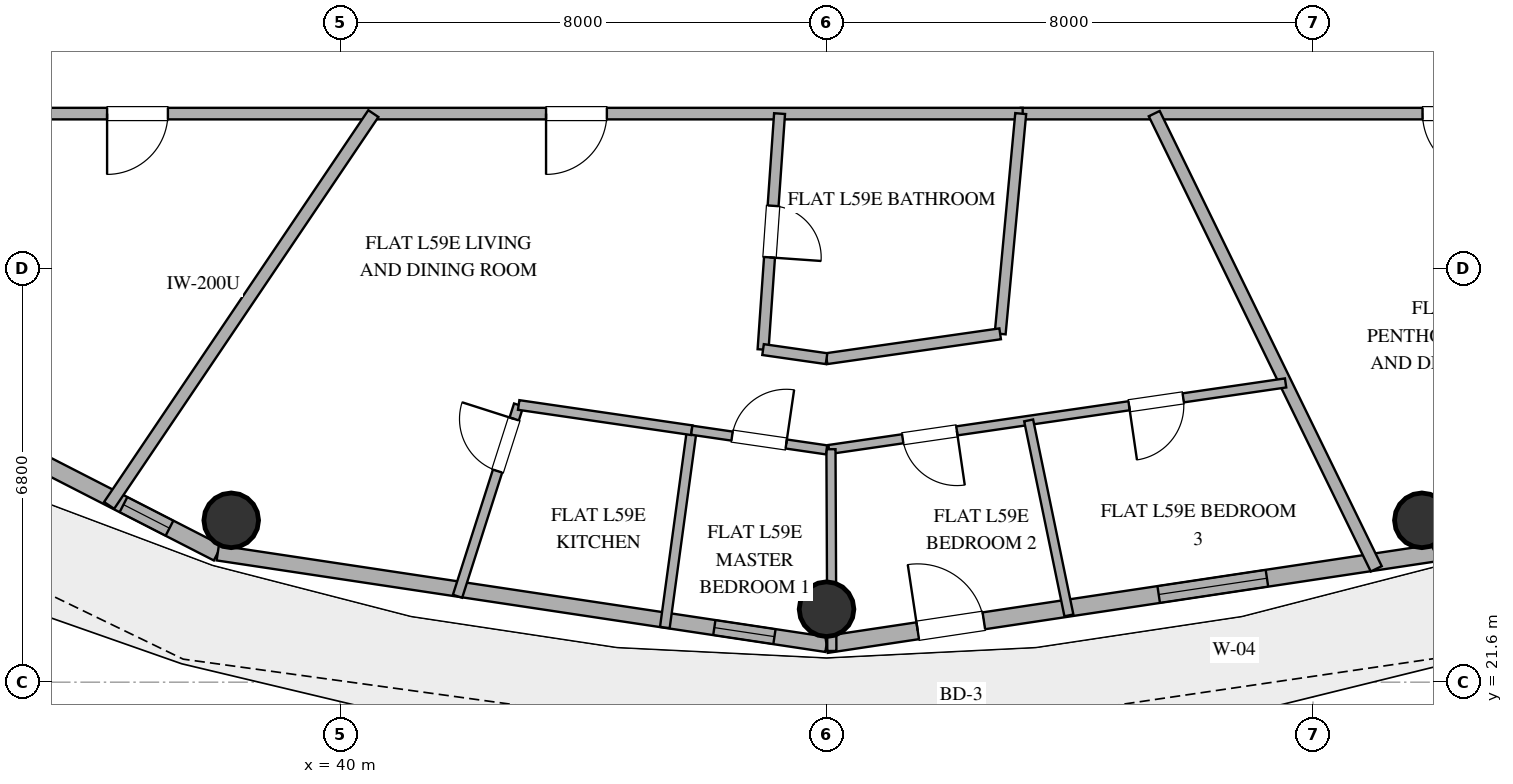
"""IFC4 building model, lengths in metres.
Left out: names, types, materials, properties, quantities, classifications, styles, units other than length and angle.
Written with IfcOpenShell. Run it as: python <this file> out.ifc"""

import sys

from ifc_helpers import new_model, si_unit, direction, frame, frame_2d, origin, origin_2d, place, context, subcontext, project, spatial, rectangle, hollow_circle, extrude, element, fill, save


model = new_model("IFC4")
c1 = context("Model", 3, precision=1e-05, world=origin(), true_north=direction((0.0, 1.0)))
c2 = subcontext(c1, "Body", "Model", "MODEL_VIEW")
j1 = project(units=[si_unit("LENGTHUNIT", "METRE"), si_unit("PLANEANGLEUNIT", "RADIAN")], contexts=[c1])
p1 = place(None, origin())
s1 = spatial("IfcSite", under=j1, at=p1, CompositionType="ELEMENT")
p2 = place(p1, origin())
s2 = spatial("IfcBuilding", under=s1, at=p2, CompositionType="ELEMENT")
p3 = place(p2, frame((0.0, 0.0, 231.6)))
s3 = spatial("IfcBuildingStorey", under=s2, at=p3, CompositionType="ELEMENT", Elevation=231.6)
for number, where, z_axis, x_axis in (
    (1, (38.209, 24.261, 0.0), (0.0, 0.0, 1.0), (1.0, 0.0, 0.0)),
    (2, (48.0, 22.8, 0.0), (0.0, 0.0, 1.0), (1.0, 0.0, 0.0)),
    (3, (57.791, 24.261, 0.0), (0.0, 0.0, 1.0), (1.0, 0.0, 0.0)),
):
    element("IfcColumn", number, at=place(p3, frame(where, z_axis=z_axis, x_axis=x_axis)), inside=s3, PredefinedType="COLUMN", context=c2, shape_type="SweptSolid", body=[
        extrude(hollow_circle(Radius=0.45, WallThickness=0.025, at=origin_2d()), origin(), (0.0, 0.0, 1.0), 3.36),
    ])
p4 = place(p3, frame((29.617, 28.013, 0.0), z_axis=(0.0, 0.0, 1.0), x_axis=(0.890007394051, -0.455946091699, 0.0)))
e4 = element("IfcWall", 4, at=p4, inside=s3, PredefinedType="SOLIDWALL", context=c2, shape_type="SweptSolid", body=[
    extrude(rectangle(XDim=9.404, YDim=0.28, at=frame_2d((4.702, 0.0))), origin(), (0.0, 0.0, 1.0), 3.36),
])
p5 = place(p4, frame((2.653, 0.0, 0.85)))
e5 = element("IfcOpeningElement", 5, at=p5, cuts=e4, PredefinedType="OPENING", context=c2, shape_type="SweptSolid", body=[
    extrude(rectangle(XDim=1.2, YDim=1.8, at=frame_2d((0.6, 0.9))), frame((0.0, 0.15, 0.0), z_axis=(0.0, -1.0, 0.0), x_axis=(1.0, 0.0, 0.0)), (0.0, 0.0, 1.0), 0.3),
])
p6 = place(p4, frame((4.93, 0.0, 0.85)))
e6 = element("IfcOpeningElement", 6, at=p6, cuts=e4, PredefinedType="OPENING", context=c2, shape_type="SweptSolid", body=[
    extrude(rectangle(XDim=1.2, YDim=1.8, at=frame_2d((0.6, 0.9))), frame((0.0, 0.15, 0.0), z_axis=(0.0, -1.0, 0.0), x_axis=(1.0, 0.0, 0.0)), (0.0, 0.0, 1.0), 0.3),
])
p7 = place(p4, frame((7.663, 0.0, 0.85)))
e7 = element("IfcOpeningElement", 7, at=p7, cuts=e4, PredefinedType="OPENING", context=c2, shape_type="SweptSolid", body=[
    extrude(rectangle(XDim=0.85, YDim=1.8, at=frame_2d((0.425, 0.9))), frame((0.0, 0.15, 0.0), z_axis=(0.0, -1.0, 0.0), x_axis=(1.0, 0.0, 0.0)), (0.0, 0.0, 1.0), 0.3),
])
p8 = place(p3, frame((37.987, 23.726, 0.0), z_axis=(0.0, 0.0, 1.0), x_axis=(0.988882522213, -0.148698881169, 0.0)))
e8 = element("IfcWall", 8, at=p8, inside=s3, PredefinedType="SOLIDWALL", context=c2, shape_type="SweptSolid", body=[
    extrude(rectangle(XDim=10.125, YDim=0.25, at=frame_2d((5.062, 0.0))), origin(), (0.0, 0.0, 1.0), 3.36),
])
p9 = place(p8, frame((8.259, 0.0, 1.42)))
e9 = element("IfcOpeningElement", 9, at=p9, cuts=e8, PredefinedType="OPENING", context=c2, shape_type="SweptSolid", body=[
    extrude(rectangle(XDim=1.0, YDim=1.05, at=frame_2d((0.5, 0.525))), frame((0.0, 0.135, 0.0), z_axis=(0.0, -1.0, 0.0), x_axis=(1.0, 0.0, 0.0)), (0.0, 0.0, 1.0), 0.27),
])
p10 = place(p3, frame((48.0, 22.22, 0.0), z_axis=(0.0, 0.0, 1.0), x_axis=(0.988882522213, 0.148698881169, 0.0)))
e10 = element("IfcWall", 10, at=p10, inside=s3, PredefinedType="SOLIDWALL", context=c2, shape_type="SweptSolid", body=[
    extrude(rectangle(XDim=10.125, YDim=0.28, at=frame_2d((5.062, 0.0))), origin(), (0.0, 0.0, 1.0), 3.36),
])
p11 = place(p10, frame((1.516, 0.0, 0.0)))
e11 = element("IfcOpeningElement", 11, at=p11, cuts=e10, PredefinedType="OPENING", context=c2, shape_type="SweptSolid", body=[
    extrude(rectangle(XDim=1.1, YDim=2.25, at=frame_2d((0.55, 1.125))), frame((0.0, 0.15, 0.0), z_axis=(0.0, -1.0, 0.0), x_axis=(1.0, 0.0, 0.0)), (0.0, 0.0, 1.0), 0.3),
])
p12 = place(p10, frame((5.524, 0.0, 0.85)))
e12 = element("IfcOpeningElement", 12, at=p12, cuts=e10, PredefinedType="OPENING", context=c2, shape_type="SweptSolid", body=[
    extrude(rectangle(XDim=1.8, YDim=2.2, at=frame_2d((0.9, 1.1))), frame((0.0, 0.15, 0.0), z_axis=(0.0, -1.0, 0.0), x_axis=(1.0, 0.0, 0.0)), (0.0, 0.0, 1.0), 0.3),
])
p13 = place(p3, frame((63.25, 30.95, 0.0), z_axis=(0.0, 0.0, 1.0), x_axis=(-1.0, 0.0, 0.0)))
e13 = element("IfcWall", 13, at=p13, inside=s3, PredefinedType="PARTITIONING", context=c2, shape_type="SweptSolid", body=[
    extrude(rectangle(XDim=12.056, YDim=0.19, at=frame_2d((6.028, 0.0))), origin(), (0.0, 0.0, 1.0), 2.72),
])
p14 = place(p13, frame((4.448, 0.0, 0.0)))
e14 = element("IfcOpeningElement", 14, at=p14, cuts=e13, PredefinedType="OPENING", context=c2, shape_type="SweptSolid", body=[
    extrude(rectangle(XDim=1.0, YDim=2.2, at=frame_2d((0.5, 1.1))), frame((0.0, 0.105, 0.0), z_axis=(0.0, -1.0, 0.0), x_axis=(1.0, 0.0, 0.0)), (0.0, 0.0, 1.0), 0.21),
])
p15 = place(p3, frame((51.226, 30.95, 0.0), z_axis=(0.0, 0.0, 1.0), x_axis=(-1.0, 0.0, 0.0)))
e15 = element("IfcWall", 15, at=p15, inside=s3, PredefinedType="PARTITIONING", context=c2, shape_type="SweptSolid", body=[
    extrude(rectangle(XDim=18.476, YDim=0.19, at=frame_2d((9.238, 0.0))), origin(), (0.0, 0.0, 1.0), 2.72),
])
p16 = place(p15, frame((14.058, 0.0, 0.0)))
e16 = element("IfcOpeningElement", 16, at=p16, cuts=e15, PredefinedType="OPENING", context=c2, shape_type="SweptSolid", body=[
    extrude(rectangle(XDim=1.0, YDim=2.2, at=frame_2d((0.5, 1.1))), frame((0.0, 0.105, 0.0), z_axis=(0.0, -1.0, 0.0), x_axis=(1.0, 0.0, 0.0)), (0.0, 0.0, 1.0), 0.21),
])
p17 = place(p15, frame((6.839, 0.0, 0.0)))
e17 = element("IfcOpeningElement", 17, at=p17, cuts=e15, PredefinedType="OPENING", context=c2, shape_type="SweptSolid", body=[
    extrude(rectangle(XDim=1.0, YDim=2.2, at=frame_2d((0.5, 1.1))), frame((0.0, 0.105, 0.0), z_axis=(0.0, -1.0, 0.0), x_axis=(1.0, 0.0, 0.0)), (0.0, 0.0, 1.0), 0.21),
])
p18 = place(p3, frame((36.201, 24.507, 0.0), z_axis=(0.0, 0.0, 1.0), x_axis=(0.559208454265, 0.8290270832, 0.0)))
e18 = element("IfcWall", 18, at=p18, inside=s3, PredefinedType="PARTITIONING", context=c2, shape_type="SweptSolid", body=[
    extrude(rectangle(XDim=7.771, YDim=0.2, at=frame_2d((3.886, 0.0))), origin(), (0.0, 0.0, 1.0), 2.72),
])
p19 = place(p3, frame((53.389, 30.95, 0.0), z_axis=(0.0, 0.0, 1.0), x_axis=(0.438386671508, -0.898786474222, 0.0)))
e19 = element("IfcWall", 19, at=p19, inside=s3, PredefinedType="PARTITIONING", context=c2, shape_type="SweptSolid", body=[
    extrude(rectangle(XDim=8.329, YDim=0.2, at=frame_2d((4.165, 0.0))), origin(), (0.0, 0.0, 1.0), 2.72),
])
p20 = place(p3, frame((55.55, 26.521, 0.0), z_axis=(0.0, 0.0, 1.0), x_axis=(-0.989535469331, -0.144289829636, 0.0)))
e20 = element("IfcWall", 20, at=p20, inside=s3, PredefinedType="PARTITIONING", context=c2, shape_type="SweptSolid", body=[
    extrude(rectangle(XDim=7.589, YDim=0.15, at=frame_2d((3.794, 0.0))), origin(), (0.0, 0.0, 1.0), 2.72),
])
p21 = place(p20, frame((1.701, 0.0, 0.0)))
e21 = element("IfcOpeningElement", 21, at=p21, cuts=e20, PredefinedType="OPENING", context=c2, shape_type="SweptSolid", body=[
    extrude(rectangle(XDim=0.9, YDim=2.1, at=frame_2d((0.45, 1.05))), frame((0.0, 0.085, 0.0), z_axis=(0.0, -1.0, 0.0), x_axis=(1.0, 0.0, 0.0)), (0.0, 0.0, 1.0), 0.17),
])
p22 = place(p20, frame((5.464, 0.0, 0.0)))
e22 = element("IfcOpeningElement", 22, at=p22, cuts=e20, PredefinedType="OPENING", context=c2, shape_type="SweptSolid", body=[
    extrude(rectangle(XDim=0.9, YDim=2.1, at=frame_2d((0.45, 1.05))), frame((0.0, 0.085, 0.0), z_axis=(0.0, -1.0, 0.0), x_axis=(1.0, 0.0, 0.0)), (0.0, 0.0, 1.0), 0.17),
])
p23 = place(p3, frame((47.227, 30.95, 0.0), z_axis=(0.0, 0.0, 1.0), x_axis=(-0.0697885329, -0.997561807948, 0.0)))
e23 = element("IfcWall", 23, at=p23, inside=s3, PredefinedType="PLUMBINGWALL", context=c2, shape_type="SweptSolid", body=[
    extrude(rectangle(XDim=3.89, YDim=0.18, at=frame_2d((1.945, 0.0))), origin(), (0.0, 0.0, 1.0), 2.72),
])
p24 = place(p23, frame((1.52, 0.0, 0.0)))
e24 = element("IfcOpeningElement", 24, at=p24, cuts=e23, PredefinedType="OPENING", context=c2, shape_type="SweptSolid", body=[
    extrude(rectangle(XDim=0.85, YDim=2.1, at=frame_2d((0.425, 1.05))), frame((0.0, 0.1, 0.0), z_axis=(0.0, -1.0, 0.0), x_axis=(1.0, 0.0, 0.0)), (0.0, 0.0, 1.0), 0.2),
])
p25 = place(p3, frame((50.855, 27.329, 0.0), z_axis=(0.0, 0.0, 1.0), x_axis=(0.093035036072, 0.995662835534, 0.0)))
e25 = element("IfcWall", 25, at=p25, inside=s3, PredefinedType="PLUMBINGWALL", context=c2, shape_type="SweptSolid", body=[
    extrude(rectangle(XDim=3.637, YDim=0.18, at=frame_2d((1.819, 0.0))), origin(), (0.0, 0.0, 1.0), 2.72),
])
p26 = place(p3, frame((48.087, 22.113, 0.0), z_axis=(0.0, 0.0, 1.0), x_axis=(-0.004415292895, 0.999990252547, 0.0)))
e26 = element("IfcWall", 26, at=p26, inside=s3, PredefinedType="PARTITIONING", context=c2, shape_type="SweptSolid", body=[
    extrude(rectangle(XDim=3.318, YDim=0.15, at=frame_2d((1.659, 0.0))), origin(), (0.0, 0.0, 1.0), 2.72),
])
p27 = place(p3, frame((41.931, 23.013, 0.0), z_axis=(0.0, 0.0, 1.0), x_axis=(0.304448437733, 0.952528817812, 0.0)))
e27 = element("IfcWall", 27, at=p27, inside=s3, PredefinedType="PLUMBINGWALL", context=c2, shape_type="SweptSolid", body=[
    extrude(rectangle(XDim=3.302, YDim=0.16, at=frame_2d((1.651, 0.0))), origin(), (0.0, 0.0, 1.0), 2.72),
])
p28 = place(p27, frame((2.161, 0.0, 0.0)))
e28 = element("IfcOpeningElement", 28, at=p28, cuts=e27, PredefinedType="OPENING", context=c2, shape_type="SweptSolid", body=[
    extrude(rectangle(XDim=0.9, YDim=2.1, at=frame_2d((0.45, 1.05))), frame((0.0, 0.09, 0.0), z_axis=(0.0, -1.0, 0.0), x_axis=(1.0, 0.0, 0.0)), (0.0, 0.0, 1.0), 0.18),
])
p29 = place(p3, frame((45.341, 22.499, 0.0), z_axis=(0.0, 0.0, 1.0), x_axis=(0.135083263994, 0.990834250412, 0.0)))
e29 = element("IfcWall", 29, at=p29, inside=s3, PredefinedType="PLUMBINGWALL", context=c2, shape_type="SweptSolid", body=[
    extrude(rectangle(XDim=3.275, YDim=0.16, at=frame_2d((1.637, 0.0))), origin(), (0.0, 0.0, 1.0), 2.72),
])
p30 = place(p3, frame((51.324, 25.905, 0.0), z_axis=(0.0, 0.0, 1.0), x_axis=(0.202292458381, -0.979325156055, 0.0)))
e30 = element("IfcWall", 30, at=p30, inside=s3, PredefinedType="PARTITIONING", context=c2, shape_type="SweptSolid", body=[
    extrude(rectangle(XDim=3.274, YDim=0.15, at=frame_2d((1.637, 0.0))), origin(), (0.0, 0.0, 1.0), 2.72),
])
p31 = place(p3, frame((48.0, 26.92, 0.0), z_axis=(0.0, 0.0, 1.0), x_axis=(0.989910519943, 0.141693904265, 0.0)))
e31 = element("IfcWall", 31, at=p31, inside=s3, PredefinedType="PLUMBINGWALL", context=c2, shape_type="SweptSolid", body=[
    extrude(rectangle(XDim=2.884, YDim=0.18, at=frame_2d((1.442, 0.0))), origin(), (0.0, 0.0, 1.0), 2.72),
])
p32 = place(p3, frame((42.937, 26.158, 0.0), z_axis=(0.0, 0.0, 1.0), x_axis=(0.989548377589, -0.144201277427, 0.0)))
e32 = element("IfcWall", 32, at=p32, inside=s3, PredefinedType="PLUMBINGWALL", context=c2, shape_type="SweptSolid", body=[
    extrude(rectangle(XDim=2.876, YDim=0.16, at=frame_2d((1.438, 0.0))), origin(), (0.0, 0.0, 1.0), 2.72),
])
p33 = place(p3, frame((45.783, 25.743, 0.0), z_axis=(0.0, 0.0, 1.0), x_axis=(0.989520009013, -0.144395816293, 0.0)))
e33 = element("IfcWall", 33, at=p33, inside=s3, PredefinedType="PARTITIONING", context=c2, shape_type="SweptSolid", body=[
    extrude(rectangle(XDim=2.24, YDim=0.15, at=frame_2d((1.12, 0.0))), origin(), (0.0, 0.0, 1.0), 2.72),
])
p34 = place(p33, frame((0.67, 0.0, 0.0)))
e34 = element("IfcOpeningElement", 34, at=p34, cuts=e33, PredefinedType="OPENING", context=c2, shape_type="SweptSolid", body=[
    extrude(rectangle(XDim=0.9, YDim=2.1, at=frame_2d((0.45, 1.05))), frame((0.0, 0.085, 0.0), z_axis=(0.0, -1.0, 0.0), x_axis=(1.0, 0.0, 0.0)), (0.0, 0.0, 1.0), 0.17),
])
p35 = place(p3, frame((46.956, 27.069, 0.0), z_axis=(0.0, 0.0, 1.0), x_axis=(0.989917064499, -0.141648174766, 0.0)))
e35 = element("IfcWall", 35, at=p35, inside=s3, PredefinedType="PLUMBINGWALL", context=c2, shape_type="SweptSolid", body=[
    extrude(rectangle(XDim=1.055, YDim=0.18, at=frame_2d((0.527, 0.0))), origin(), (0.0, 0.0, 1.0), 2.72),
])
p36 = place(p11, origin())
e36 = element("IfcDoor", 36, at=p36, inside=s3, OperationType="SINGLE_SWING_LEFT", PredefinedType="DOOR", context=c2, shape_type="SweptSolid", body=[
    extrude(rectangle(XDim=1.1, YDim=2.25, at=frame_2d((0.55, 1.125))), frame((0.0, 0.025, 0.0), z_axis=(0.0, -1.0, 0.0), x_axis=(1.0, 0.0, 0.0)), (0.0, 0.0, 1.0), 0.05),
])
fill(e11, e36)
p37 = place(p12, origin())
e37 = element("IfcWindow", 37, at=p37, inside=s3, PartitioningType="SINGLE_PANEL", PredefinedType="WINDOW", context=c2, shape_type="SweptSolid", body=[
    extrude(rectangle(XDim=1.8, YDim=2.2, at=frame_2d((0.9, 1.1))), frame((0.0, 0.03, 0.0), z_axis=(0.0, -1.0, 0.0), x_axis=(1.0, 0.0, 0.0)), (0.0, 0.0, 1.0), 0.06),
])
fill(e12, e37)
p38 = place(p7, origin())
e38 = element("IfcWindow", 38, at=p38, inside=s3, PartitioningType="SINGLE_PANEL", PredefinedType="WINDOW", context=c2, shape_type="SweptSolid", body=[
    extrude(rectangle(XDim=0.85, YDim=1.8, at=frame_2d((0.425, 0.9))), frame((0.0, 0.03, 0.0), z_axis=(0.0, -1.0, 0.0), x_axis=(1.0, 0.0, 0.0)), (0.0, 0.0, 1.0), 0.06),
])
fill(e7, e38)
p39 = place(p9, origin())
e39 = element("IfcWindow", 39, at=p39, inside=s3, PartitioningType="SINGLE_PANEL", PredefinedType="WINDOW", context=c2, shape_type="SweptSolid", body=[
    extrude(rectangle(XDim=1.0, YDim=1.05, at=frame_2d((0.5, 0.525))), frame((0.0, 0.03, 0.0), z_axis=(0.0, -1.0, 0.0), x_axis=(1.0, 0.0, 0.0)), (0.0, 0.0, 1.0), 0.06),
])
fill(e9, e39)
p40 = place(p14, origin())
e40 = element("IfcDoor", 40, at=p40, inside=s3, OperationType="SINGLE_SWING_LEFT", PredefinedType="DOOR", context=c2, shape_type="SweptSolid", body=[
    extrude(rectangle(XDim=1.0, YDim=2.2, at=frame_2d((0.5, 1.1))), frame((0.0, 0.025, 0.0), z_axis=(0.0, -1.0, 0.0), x_axis=(1.0, 0.0, 0.0)), (0.0, 0.0, 1.0), 0.05),
])
fill(e14, e40)
p41 = place(p16, origin())
e41 = element("IfcDoor", 41, at=p41, inside=s3, OperationType="SINGLE_SWING_RIGHT", PredefinedType="DOOR", context=c2, shape_type="SweptSolid", body=[
    extrude(rectangle(XDim=1.0, YDim=2.2, at=frame_2d((0.5, 1.1))), frame((0.0, 0.025, 0.0), z_axis=(0.0, -1.0, 0.0), x_axis=(1.0, 0.0, 0.0)), (0.0, 0.0, 1.0), 0.05),
])
fill(e16, e41)
p42 = place(p17, origin())
e42 = element("IfcDoor", 42, at=p42, inside=s3, OperationType="SINGLE_SWING_RIGHT", PredefinedType="DOOR", context=c2, shape_type="SweptSolid", body=[
    extrude(rectangle(XDim=1.0, YDim=2.2, at=frame_2d((0.5, 1.1))), frame((0.0, 0.025, 0.0), z_axis=(0.0, -1.0, 0.0), x_axis=(1.0, 0.0, 0.0)), (0.0, 0.0, 1.0), 0.05),
])
fill(e17, e42)
p43 = place(p21, origin())
e43 = element("IfcDoor", 43, at=p43, inside=s3, OperationType="SINGLE_SWING_RIGHT", PredefinedType="DOOR", context=c2, shape_type="SweptSolid", body=[
    extrude(rectangle(XDim=0.9, YDim=2.1, at=frame_2d((0.45, 1.05))), frame((0.0, 0.025, 0.0), z_axis=(0.0, -1.0, 0.0), x_axis=(1.0, 0.0, 0.0)), (0.0, 0.0, 1.0), 0.05),
])
fill(e21, e43)
p44 = place(p22, origin())
e44 = element("IfcDoor", 44, at=p44, inside=s3, OperationType="SINGLE_SWING_LEFT", PredefinedType="DOOR", context=c2, shape_type="SweptSolid", body=[
    extrude(rectangle(XDim=0.9, YDim=2.1, at=frame_2d((0.45, 1.05))), frame((0.0, 0.025, 0.0), z_axis=(0.0, -1.0, 0.0), x_axis=(1.0, 0.0, 0.0)), (0.0, 0.0, 1.0), 0.05),
])
fill(e22, e44)
p45 = place(p24, origin())
e45 = element("IfcDoor", 45, at=p45, inside=s3, OperationType="SINGLE_SWING_RIGHT", PredefinedType="DOOR", context=c2, shape_type="SweptSolid", body=[
    extrude(rectangle(XDim=0.85, YDim=2.1, at=frame_2d((0.425, 1.05))), frame((0.0, 0.025, 0.0), z_axis=(0.0, -1.0, 0.0), x_axis=(1.0, 0.0, 0.0)), (0.0, 0.0, 1.0), 0.05),
])
fill(e24, e45)
p46 = place(p28, origin())
e46 = element("IfcDoor", 46, at=p46, inside=s3, OperationType="SINGLE_SWING_RIGHT", PredefinedType="DOOR", context=c2, shape_type="SweptSolid", body=[
    extrude(rectangle(XDim=0.9, YDim=2.1, at=frame_2d((0.45, 1.05))), frame((0.0, 0.025, 0.0), z_axis=(0.0, -1.0, 0.0), x_axis=(1.0, 0.0, 0.0)), (0.0, 0.0, 1.0), 0.05),
])
fill(e28, e46)
p47 = place(p34, origin())
e47 = element("IfcDoor", 47, at=p47, inside=s3, OperationType="SINGLE_SWING_RIGHT", PredefinedType="DOOR", context=c2, shape_type="SweptSolid", body=[
    extrude(rectangle(XDim=0.9, YDim=2.1, at=frame_2d((0.45, 1.05))), frame((0.0, 0.025, 0.0), z_axis=(0.0, -1.0, 0.0), x_axis=(1.0, 0.0, 0.0)), (0.0, 0.0, 1.0), 0.05),
])
fill(e34, e47)
save(model, sys.argv[1])
